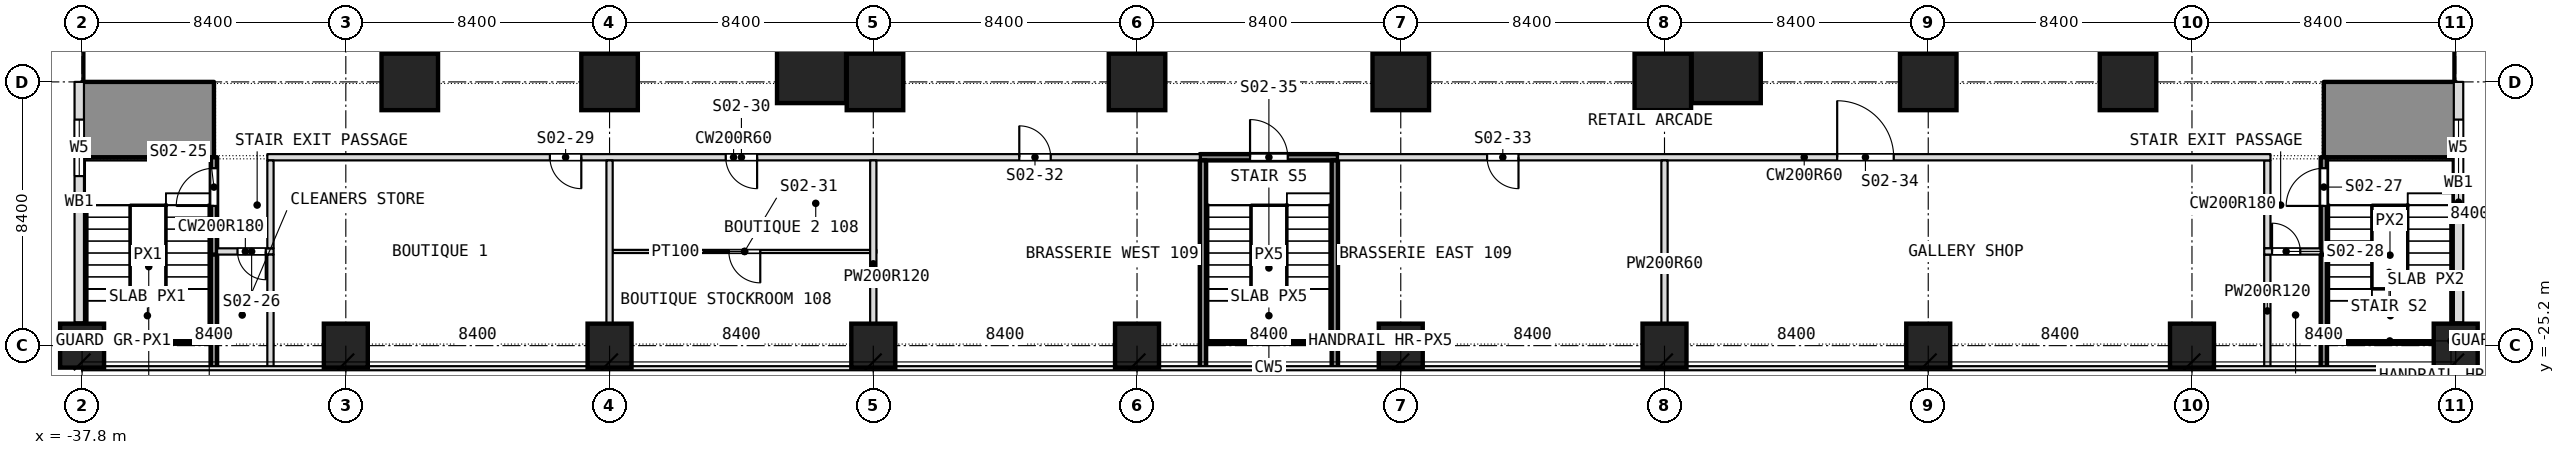
"""IFC4 building model, lengths in metres.
Left out: names, types, materials, properties, quantities, classifications, styles, units other than length and angle.
Written with IfcOpenShell. Run it as: python <this file> out.ifc"""

import sys

from ifc_helpers import new_model, si_unit, direction, frame, frame_2d, origin, origin_2d, place, context, subcontext, project, spatial, rectangle, extrude, element, fill, save


model = new_model("IFC4")
c1 = context("Model", 3, precision=1e-05, world=origin(), true_north=direction((0.0, 1.0)))
c2 = subcontext(c1, "Body", "Model", "MODEL_VIEW")
j1 = project(units=[si_unit("LENGTHUNIT", "METRE"), si_unit("PLANEANGLEUNIT", "RADIAN")], contexts=[c1])
p1 = place(None, origin())
s1 = spatial("IfcSite", under=j1, at=p1, CompositionType="ELEMENT")
p2 = place(p1, origin())
s2 = spatial("IfcBuilding", under=s1, at=p2, CompositionType="ELEMENT")
p3 = place(p2, frame((0.0, 0.0, 8.0)))
s3 = spatial("IfcBuildingStorey", under=s2, at=p3, CompositionType="ELEMENT", Elevation=8.0)
for number, where, z_axis, x_axis in (
    (1, (-37.8, -25.2, 0.0), (0.0, 0.0, 1.0), (1.0, 0.0, 0.0)),
    (2, (-29.4, -25.2, 0.0), (0.0, 0.0, 1.0), (1.0, 0.0, 0.0)),
    (3, (-21.0, -25.2, 0.0), (0.0, 0.0, 1.0), (1.0, 0.0, 0.0)),
    (4, (-12.6, -25.2, 0.0), (0.0, 0.0, 1.0), (1.0, 0.0, 0.0)),
    (5, (-4.2, -25.2, 0.0), (0.0, 0.0, 1.0), (1.0, 0.0, 0.0)),
    (6, (4.2, -25.2, 0.0), (0.0, 0.0, 1.0), (1.0, 0.0, 0.0)),
    (7, (12.6, -25.2, 0.0), (0.0, 0.0, 1.0), (1.0, 0.0, 0.0)),
    (8, (21.0, -25.2, 0.0), (0.0, 0.0, 1.0), (1.0, 0.0, 0.0)),
    (9, (29.4, -25.2, 0.0), (0.0, 0.0, 1.0), (1.0, 0.0, 0.0)),
    (10, (37.8, -25.2, 0.0), (0.0, 0.0, 1.0), (1.0, 0.0, 0.0)),
):
    element("IfcColumn", number, at=place(p3, frame(where, z_axis=z_axis, x_axis=x_axis)), inside=s3, PredefinedType="COLUMN", context=c2, shape_type="SweptSolid", body=[
        extrude(rectangle(XDim=1.4, YDim=1.4, at=origin_2d()), origin(), (0.0, 0.0, 1.0), 5.0),
    ])
for number, where, z_axis, x_axis in (
    (11, (-21.0, -16.8, 0.0), (0.0, 0.0, 1.0), (1.0, 0.0, 0.0)),
    (12, (-12.546, -16.8, 0.0), (0.0, 0.0, 1.0), (1.0, 0.0, 0.0)),
    (13, (-4.2, -16.8, 0.0), (0.0, 0.0, 1.0), (1.0, 0.0, 0.0)),
    (14, (4.2, -16.8, 0.0), (0.0, 0.0, 1.0), (1.0, 0.0, 0.0)),
    (15, (12.546, -16.8, 0.0), (0.0, 0.0, 1.0), (1.0, 0.0, 0.0)),
    (16, (21.0, -16.8, 0.0), (0.0, 0.0, 1.0), (1.0, 0.0, 0.0)),
    (17, (-27.363, -16.8, 0.0), (0.0, 0.0, 1.0), (1.0, 0.0, 0.0)),
    (18, (27.363, -16.8, 0.0), (0.0, 0.0, 1.0), (1.0, 0.0, 0.0)),
):
    element("IfcColumn", number, at=place(p3, frame(where, z_axis=z_axis, x_axis=x_axis)), inside=s3, PredefinedType="COLUMN", context=c2, shape_type="SweptSolid", body=[
        extrude(rectangle(XDim=1.8, YDim=1.8, at=origin_2d()), origin(), (0.0, 0.0, 1.0), 5.0),
    ])
for number, where, z_axis, x_axis in (
    (19, (-14.566, -16.375, 0.0), (0.0, 0.0, 1.0), (1.0, 0.0, 0.0)),
    (20, (14.566, -16.375, 0.0), (0.0, 0.0, 1.0), (1.0, 0.0, 0.0)),
):
    element("IfcColumn", number, at=place(p3, frame(where, z_axis=z_axis, x_axis=x_axis)), inside=s3, PredefinedType="COLUMN", context=c2, shape_type="SweptSolid", body=[
        extrude(rectangle(XDim=2.2, YDim=2.2, at=origin_2d()), origin(), (0.0, 0.0, 1.0), 5.0),
    ])
for number, where, z_axis, x_axis in (
    (21, (-37.8, -18.0, 0.0), (0.0, 0.0, 1.0), (1.0, 0.0, 0.0)),
    (22, (33.6, -18.0, 0.0), (0.0, 0.0, 1.0), (1.0, 0.0, 0.0)),
):
    element("IfcWall", number, at=place(p3, frame(where, z_axis=z_axis, x_axis=x_axis)), inside=s3, PredefinedType="SOLIDWALL", context=c2, shape_type="SweptSolid", body=[
        extrude(rectangle(XDim=4.2, YDim=2.4, at=frame_2d((2.1, 0.0))), origin(), (0.0, 0.0, 1.0), 5.0),
    ])
p4 = place(p3, frame((33.6, -25.889, 0.0), z_axis=(0.0, 0.0, 1.0), x_axis=(0.0, 1.0, 0.0)))
e23 = element("IfcWall", 23, at=p4, inside=s3, PredefinedType="PARTITIONING", context=c2, shape_type="SweptSolid", body=[
    extrude(rectangle(XDim=3.789, YDim=0.2, at=frame_2d((1.895, 0.0))), origin(), (0.0, 0.0, 1.0), 4.68),
])
p5 = place(p3, frame((33.6, -22.3, 0.0), z_axis=(0.0, 0.0, 1.0), x_axis=(0.0, 1.0, 0.0)))
e24 = element("IfcWall", 24, at=p5, inside=s3, PredefinedType="PARTITIONING", context=c2, shape_type="SweptSolid", body=[
    extrude(rectangle(XDim=3.1, YDim=0.2, at=frame_2d((1.55, 0.0))), origin(), (0.0, 0.0, 1.0), 4.68),
])
p6 = place(p5, frame((1.55, 0.0, 0.0)))
e25 = element("IfcOpeningElement", 25, at=p6, cuts=e24, PredefinedType="OPENING", context=c2, shape_type="SweptSolid", body=[
    extrude(rectangle(XDim=1.2, YDim=2.1, at=frame_2d((0.6, 1.05))), frame((0.0, 0.1, 0.0), z_axis=(0.0, -1.0, 0.0), x_axis=(1.0, 0.0, 0.0)), (0.0, 0.0, 1.0), 0.2),
])
p7 = place(p3, frame((31.8, -25.889, 0.0), z_axis=(0.0, 0.0, 1.0), x_axis=(0.0, 1.0, 0.0)))
e26 = element("IfcWall", 26, at=p7, inside=s3, PredefinedType="PARTITIONING", context=c2, shape_type="SweptSolid", body=[
    extrude(rectangle(XDim=3.589, YDim=0.2, at=frame_2d((1.794, 0.0))), origin(), (0.0, 0.0, 1.0), 4.68),
])
p8 = place(p3, frame((31.8, -22.1, 0.0), z_axis=(0.0, 0.0, 1.0), x_axis=(0.0, 1.0, 0.0)))
e27 = element("IfcWall", 27, at=p8, inside=s3, PredefinedType="PARTITIONING", context=c2, shape_type="SweptSolid", body=[
    extrude(rectangle(XDim=2.8, YDim=0.2, at=frame_2d((1.4, 0.0))), origin(), (0.0, 0.0, 1.0), 4.68),
])
p9 = place(p3, frame((-33.5, -22.2, 0.0), z_axis=(0.0, 0.0, 1.0), x_axis=(1.0, 0.0, 0.0)))
e28 = element("IfcWall", 28, at=p9, inside=s3, PredefinedType="PARTITIONING", context=c2, shape_type="SweptSolid", body=[
    extrude(rectangle(XDim=1.8, YDim=0.2, at=frame_2d((0.9, 0.0))), origin(), (0.0, 0.0, 1.0), 4.68),
])
p10 = place(p9, frame((0.65, 0.0, 0.0)))
e29 = element("IfcOpeningElement", 29, at=p10, cuts=e28, PredefinedType="OPENING", context=c2, shape_type="SweptSolid", body=[
    extrude(rectangle(XDim=0.9, YDim=2.1, at=frame_2d((0.45, 1.05))), frame((0.0, 0.1, 0.0), z_axis=(0.0, -1.0, 0.0), x_axis=(1.0, 0.0, 0.0)), (0.0, 0.0, 1.0), 0.2),
])
p11 = place(p3, frame((31.7, -22.2, 0.0), z_axis=(0.0, 0.0, 1.0), x_axis=(1.0, 0.0, 0.0)))
e30 = element("IfcWall", 30, at=p11, inside=s3, PredefinedType="PARTITIONING", context=c2, shape_type="SweptSolid", body=[
    extrude(rectangle(XDim=1.8, YDim=0.2, at=frame_2d((0.9, 0.0))), origin(), (0.0, 0.0, 1.0), 4.68),
])
p12 = place(p11, frame((0.25, 0.0, 0.0)))
e31 = element("IfcOpeningElement", 31, at=p12, cuts=e30, PredefinedType="OPENING", context=c2, shape_type="SweptSolid", body=[
    extrude(rectangle(XDim=0.9, YDim=2.1, at=frame_2d((0.45, 1.05))), frame((0.0, 0.1, 0.0), z_axis=(0.0, -1.0, 0.0), x_axis=(1.0, 0.0, 0.0)), (0.0, 0.0, 1.0), 0.2),
])
p13 = place(p3, frame((-20.9, -22.2, 0.0), z_axis=(0.0, 0.0, 1.0), x_axis=(1.0, 0.0, 0.0)))
e32 = element("IfcWall", 32, at=p13, inside=s3, PredefinedType="PARTITIONING", context=c2, shape_type="SweptSolid", body=[
    extrude(rectangle(XDim=8.4, YDim=0.1, at=frame_2d((4.2, 0.0))), origin(), (0.0, 0.0, 1.0), 4.68),
])
p14 = place(p13, frame((3.7, 0.0, 0.0)))
e33 = element("IfcOpeningElement", 33, at=p14, cuts=e32, PredefinedType="OPENING", context=c2, shape_type="SweptSolid", body=[
    extrude(rectangle(XDim=1.0, YDim=2.1, at=frame_2d((0.5, 1.05))), frame((0.0, 0.05, 0.0), z_axis=(0.0, -1.0, 0.0), x_axis=(1.0, 0.0, 0.0)), (0.0, 0.0, 1.0), 0.1),
])
p15 = place(p3, frame((-31.9, -19.2, 0.0), z_axis=(0.0, 0.0, 1.0), x_axis=(1.0, 0.0, 0.0)))
e34 = element("IfcWall", 34, at=p15, inside=s3, PredefinedType="PARTITIONING", context=c2, shape_type="SweptSolid", body=[
    extrude(rectangle(XDim=29.7, YDim=0.2, at=frame_2d((14.85, 0.0))), origin(), (0.0, 0.0, 1.0), 4.68),
])
p16 = place(p15, frame((9.0, 0.0, 0.0)))
e35 = element("IfcOpeningElement", 35, at=p16, cuts=e34, PredefinedType="OPENING", context=c2, shape_type="SweptSolid", body=[
    extrude(rectangle(XDim=1.0, YDim=2.1, at=frame_2d((0.5, 1.05))), frame((0.0, 0.1, 0.0), z_axis=(0.0, -1.0, 0.0), x_axis=(1.0, 0.0, 0.0)), (0.0, 0.0, 1.0), 0.2),
])
p17 = place(p15, frame((14.6, 0.0, 0.0)))
e36 = element("IfcOpeningElement", 36, at=p17, cuts=e34, PredefinedType="OPENING", context=c2, shape_type="SweptSolid", body=[
    extrude(rectangle(XDim=1.0, YDim=2.1, at=frame_2d((0.5, 1.05))), frame((0.0, 0.1, 0.0), z_axis=(0.0, -1.0, 0.0), x_axis=(1.0, 0.0, 0.0)), (0.0, 0.0, 1.0), 0.2),
])
p18 = place(p15, frame((23.95, 0.0, 0.0)))
e37 = element("IfcOpeningElement", 37, at=p18, cuts=e34, PredefinedType="OPENING", context=c2, shape_type="SweptSolid", body=[
    extrude(rectangle(XDim=1.0, YDim=2.1, at=frame_2d((0.5, 1.05))), frame((0.0, 0.1, 0.0), z_axis=(0.0, -1.0, 0.0), x_axis=(1.0, 0.0, 0.0)), (0.0, 0.0, 1.0), 0.2),
])
p19 = place(p3, frame((2.2, -19.2, 0.0), z_axis=(0.0, 0.0, 1.0), x_axis=(1.0, 0.0, 0.0)))
e38 = element("IfcWall", 38, at=p19, inside=s3, PredefinedType="PARTITIONING", context=c2, shape_type="SweptSolid", body=[
    extrude(rectangle(XDim=29.7, YDim=0.2, at=frame_2d((14.85, 0.0))), origin(), (0.0, 0.0, 1.0), 4.68),
])
p20 = place(p19, frame((4.75, 0.0, 0.0)))
e39 = element("IfcOpeningElement", 39, at=p20, cuts=e38, PredefinedType="OPENING", context=c2, shape_type="SweptSolid", body=[
    extrude(rectangle(XDim=1.0, YDim=2.1, at=frame_2d((0.5, 1.05))), frame((0.0, 0.1, 0.0), z_axis=(0.0, -1.0, 0.0), x_axis=(1.0, 0.0, 0.0)), (0.0, 0.0, 1.0), 0.2),
])
p21 = place(p19, frame((15.9, 0.0, 0.0)))
e40 = element("IfcOpeningElement", 40, at=p21, cuts=e38, PredefinedType="OPENING", context=c2, shape_type="SweptSolid", body=[
    extrude(rectangle(XDim=1.8, YDim=2.1, at=frame_2d((0.9, 1.05))), frame((0.0, 0.1, 0.0), z_axis=(0.0, -1.0, 0.0), x_axis=(1.0, 0.0, 0.0)), (0.0, 0.0, 1.0), 0.2),
])
p22 = place(p3, frame((-2.2, -19.2, 0.0), z_axis=(0.0, 0.0, 1.0), x_axis=(1.0, 0.0, 0.0)))
e41 = element("IfcWall", 41, at=p22, inside=s3, PredefinedType="PARTITIONING", context=c2, shape_type="SweptSolid", body=[
    extrude(rectangle(XDim=4.4, YDim=0.2, at=frame_2d((2.2, 0.0))), origin(), (0.0, 0.0, 1.0), 4.68),
])
p23 = place(p22, frame((1.6, 0.0, 0.0)))
e42 = element("IfcOpeningElement", 42, at=p23, cuts=e41, PredefinedType="OPENING", context=c2, shape_type="SweptSolid", body=[
    extrude(rectangle(XDim=1.2, YDim=2.1, at=frame_2d((0.6, 1.05))), frame((0.0, 0.1, 0.0), z_axis=(0.0, -1.0, 0.0), x_axis=(1.0, 0.0, 0.0)), (0.0, 0.0, 1.0), 0.2),
])
for number, where, z_axis, x_axis in (
    (43, (12.6, -25.889, 0.0), (0.0, 0.0, 1.0), (0.0, 1.0, 0.0)),
    (44, (2.1, -25.889, 0.0), (0.0, 0.0, 1.0), (0.0, 1.0, 0.0)),
    (45, (-2.1, -25.889, 0.0), (0.0, 0.0, 1.0), (0.0, 1.0, 0.0)),
    (46, (-12.6, -25.889, 0.0), (0.0, 0.0, 1.0), (0.0, 1.0, 0.0)),
    (47, (-21.0, -25.889, 0.0), (0.0, 0.0, 1.0), (0.0, 1.0, 0.0)),
):
    element("IfcWall", number, at=place(p3, frame(where, z_axis=z_axis, x_axis=x_axis)), inside=s3, PredefinedType="PARTITIONING", context=c2, shape_type="SweptSolid", body=[
        extrude(rectangle(XDim=6.589, YDim=0.2, at=frame_2d((3.294, 0.0))), origin(), (0.0, 0.0, 1.0), 4.68),
    ])
p24 = place(p3, frame((-31.8, -25.889, 0.0), z_axis=(0.0, 0.0, 1.0), x_axis=(0.0, 1.0, 0.0)))
e48 = element("IfcWall", 48, at=p24, inside=s3, PredefinedType="PARTITIONING", context=c2, shape_type="SweptSolid", body=[
    extrude(rectangle(XDim=3.589, YDim=0.2, at=frame_2d((1.794, 0.0))), origin(), (0.0, 0.0, 1.0), 4.68),
])
p25 = place(p3, frame((-31.8, -22.1, 0.0), z_axis=(0.0, 0.0, 1.0), x_axis=(0.0, 1.0, 0.0)))
e49 = element("IfcWall", 49, at=p25, inside=s3, PredefinedType="PARTITIONING", context=c2, shape_type="SweptSolid", body=[
    extrude(rectangle(XDim=2.8, YDim=0.2, at=frame_2d((1.4, 0.0))), origin(), (0.0, 0.0, 1.0), 4.68),
])
p26 = place(p3, frame((-33.6, -25.889, 0.0), z_axis=(0.0, 0.0, 1.0), x_axis=(0.0, 1.0, 0.0)))
e50 = element("IfcWall", 50, at=p26, inside=s3, PredefinedType="PARTITIONING", context=c2, shape_type="SweptSolid", body=[
    extrude(rectangle(XDim=3.789, YDim=0.2, at=frame_2d((1.895, 0.0))), origin(), (0.0, 0.0, 1.0), 4.68),
])
p27 = place(p3, frame((-33.6, -22.3, 0.0), z_axis=(0.0, 0.0, 1.0), x_axis=(0.0, 1.0, 0.0)))
e51 = element("IfcWall", 51, at=p27, inside=s3, PredefinedType="PARTITIONING", context=c2, shape_type="SweptSolid", body=[
    extrude(rectangle(XDim=3.1, YDim=0.2, at=frame_2d((1.55, 0.0))), origin(), (0.0, 0.0, 1.0), 4.68),
])
p28 = place(p27, frame((1.55, 0.0, 0.0)))
e52 = element("IfcOpeningElement", 52, at=p28, cuts=e51, PredefinedType="OPENING", context=c2, shape_type="SweptSolid", body=[
    extrude(rectangle(XDim=1.2, YDim=2.1, at=frame_2d((0.6, 1.05))), frame((0.0, 0.1, 0.0), z_axis=(0.0, -1.0, 0.0), x_axis=(1.0, 0.0, 0.0)), (0.0, 0.0, 1.0), 0.2),
])
p29 = place(p3, frame((37.89, -24.46, 0.0), z_axis=(0.0, 0.0, 1.0), x_axis=(0.0, 1.0, 0.0)))
e53 = element("IfcWall", 53, at=p29, inside=s3, PredefinedType="NOTDEFINED", context=c2, shape_type="SweptSolid", body=[
    extrude(rectangle(XDim=7.66, YDim=0.3, at=frame_2d((3.83, 0.0))), origin(), (0.0, 0.0, 1.0), 3.78),
])
p30 = place(p29, frame((4.66, 0.0, 1.2)))
e54 = element("IfcOpeningElement", 54, at=p30, cuts=e53, PredefinedType="OPENING", context=c2, shape_type="SweptSolid", body=[
    extrude(rectangle(XDim=1.8, YDim=2.4, at=frame_2d((0.9, 1.2))), frame((0.0, 0.15, 0.0), z_axis=(0.0, -1.0, 0.0), x_axis=(1.0, 0.0, 0.0)), (0.0, 0.0, 1.0), 0.3),
])
p31 = place(p3, frame((-37.89, -16.8, 0.0), z_axis=(0.0, 0.0, 1.0), x_axis=(0.0, -1.0, 0.0)))
e55 = element("IfcWall", 55, at=p31, inside=s3, PredefinedType="NOTDEFINED", context=c2, shape_type="SweptSolid", body=[
    extrude(rectangle(XDim=7.66, YDim=0.3, at=frame_2d((3.83, 0.0))), origin(), (0.0, 0.0, 1.0), 3.78),
])
p32 = place(p31, frame((1.2, 0.0, 1.2)))
e56 = element("IfcOpeningElement", 56, at=p32, cuts=e55, PredefinedType="OPENING", context=c2, shape_type="SweptSolid", body=[
    extrude(rectangle(XDim=1.8, YDim=2.4, at=frame_2d((0.9, 1.2))), frame((0.0, 0.15, 0.0), z_axis=(0.0, -1.0, 0.0), x_axis=(1.0, 0.0, 0.0)), (0.0, 0.0, 1.0), 0.3),
])
p33 = place(p6, origin())
e57 = element("IfcDoor", 57, at=p33, inside=s3, OperationType="SINGLE_SWING_LEFT", PredefinedType="DOOR", context=c2, shape_type="SweptSolid", body=[
    extrude(rectangle(XDim=1.2, YDim=2.1, at=frame_2d((0.6, 1.05))), frame((0.0, 0.025, 0.0), z_axis=(0.0, -1.0, 0.0), x_axis=(1.0, 0.0, 0.0)), (0.0, 0.0, 1.0), 0.05),
])
fill(e25, e57)
p34 = place(p10, origin())
e58 = element("IfcDoor", 58, at=p34, inside=s3, OperationType="SINGLE_SWING_LEFT", PredefinedType="DOOR", context=c2, shape_type="SweptSolid", body=[
    extrude(rectangle(XDim=0.9, YDim=2.1, at=frame_2d((0.45, 1.05))), frame((0.0, 0.025, 0.0), z_axis=(0.0, -1.0, 0.0), x_axis=(1.0, 0.0, 0.0)), (0.0, 0.0, 1.0), 0.05),
])
fill(e29, e58)
p35 = place(p12, origin())
e59 = element("IfcDoor", 59, at=p35, inside=s3, OperationType="SINGLE_SWING_RIGHT", PredefinedType="DOOR", context=c2, shape_type="SweptSolid", body=[
    extrude(rectangle(XDim=0.9, YDim=2.1, at=frame_2d((0.45, 1.05))), frame((0.0, 0.025, 0.0), z_axis=(0.0, -1.0, 0.0), x_axis=(1.0, 0.0, 0.0)), (0.0, 0.0, 1.0), 0.05),
])
fill(e31, e59)
p36 = place(p14, origin())
e60 = element("IfcDoor", 60, at=p36, inside=s3, OperationType="SINGLE_SWING_LEFT", PredefinedType="DOOR", context=c2, shape_type="SweptSolid", body=[
    extrude(rectangle(XDim=1.0, YDim=2.1, at=frame_2d((0.5, 1.05))), frame((0.0, 0.025, 0.0), z_axis=(0.0, -1.0, 0.0), x_axis=(1.0, 0.0, 0.0)), (0.0, 0.0, 1.0), 0.05),
])
fill(e33, e60)
p37 = place(p16, origin())
e61 = element("IfcDoor", 61, at=p37, inside=s3, OperationType="SINGLE_SWING_RIGHT", PredefinedType="DOOR", context=c2, shape_type="SweptSolid", body=[
    extrude(rectangle(XDim=1.0, YDim=2.1, at=frame_2d((0.5, 1.05))), frame((0.0, 0.025, 0.0), z_axis=(0.0, -1.0, 0.0), x_axis=(1.0, 0.0, 0.0)), (0.0, 0.0, 1.0), 0.05),
])
fill(e35, e61)
p38 = place(p17, origin())
e62 = element("IfcDoor", 62, at=p38, inside=s3, OperationType="SINGLE_SWING_RIGHT", PredefinedType="DOOR", context=c2, shape_type="SweptSolid", body=[
    extrude(rectangle(XDim=1.0, YDim=2.1, at=frame_2d((0.5, 1.05))), frame((0.0, 0.025, 0.0), z_axis=(0.0, -1.0, 0.0), x_axis=(1.0, 0.0, 0.0)), (0.0, 0.0, 1.0), 0.05),
])
fill(e36, e62)
p39 = place(p18, origin())
e63 = element("IfcDoor", 63, at=p39, inside=s3, OperationType="SINGLE_SWING_RIGHT", PredefinedType="DOOR", context=c2, shape_type="SweptSolid", body=[
    extrude(rectangle(XDim=1.0, YDim=2.1, at=frame_2d((0.5, 1.05))), frame((0.0, 0.025, 0.0), z_axis=(0.0, -1.0, 0.0), x_axis=(1.0, 0.0, 0.0)), (0.0, 0.0, 1.0), 0.05),
])
fill(e37, e63)
p40 = place(p20, origin())
e64 = element("IfcDoor", 64, at=p40, inside=s3, OperationType="SINGLE_SWING_LEFT", PredefinedType="DOOR", context=c2, shape_type="SweptSolid", body=[
    extrude(rectangle(XDim=1.0, YDim=2.1, at=frame_2d((0.5, 1.05))), frame((0.0, 0.025, 0.0), z_axis=(0.0, -1.0, 0.0), x_axis=(1.0, 0.0, 0.0)), (0.0, 0.0, 1.0), 0.05),
])
fill(e39, e64)
p41 = place(p21, origin())
e65 = element("IfcDoor", 65, at=p41, inside=s3, OperationType="DOUBLE_DOOR_SINGLE_SWING", PredefinedType="DOOR", context=c2, shape_type="SweptSolid", body=[
    extrude(rectangle(XDim=1.8, YDim=2.1, at=frame_2d((0.9, 1.05))), frame((0.0, 0.025, 0.0), z_axis=(0.0, -1.0, 0.0), x_axis=(1.0, 0.0, 0.0)), (0.0, 0.0, 1.0), 0.05),
])
fill(e40, e65)
p42 = place(p23, origin())
e66 = element("IfcDoor", 66, at=p42, inside=s3, OperationType="SINGLE_SWING_LEFT", PredefinedType="DOOR", context=c2, shape_type="SweptSolid", body=[
    extrude(rectangle(XDim=1.2, YDim=2.1, at=frame_2d((0.6, 1.05))), frame((0.0, 0.025, 0.0), z_axis=(0.0, -1.0, 0.0), x_axis=(1.0, 0.0, 0.0)), (0.0, 0.0, 1.0), 0.05),
])
fill(e42, e66)
p43 = place(p28, origin())
e67 = element("IfcDoor", 67, at=p43, inside=s3, OperationType="SINGLE_SWING_RIGHT", PredefinedType="DOOR", context=c2, shape_type="SweptSolid", body=[
    extrude(rectangle(XDim=1.2, YDim=2.1, at=frame_2d((0.6, 1.05))), frame((0.0, 0.025, 0.0), z_axis=(0.0, -1.0, 0.0), x_axis=(1.0, 0.0, 0.0)), (0.0, 0.0, 1.0), 0.05),
])
fill(e52, e67)
p44 = place(p30, origin())
e68 = element("IfcWindow", 68, at=p44, inside=s3, PartitioningType="SINGLE_PANEL", PredefinedType="WINDOW", context=c2, shape_type="SweptSolid", body=[
    extrude(rectangle(XDim=1.8, YDim=2.4, at=frame_2d((0.9, 1.2))), frame((0.0, 0.03, 0.0), z_axis=(0.0, -1.0, 0.0), x_axis=(1.0, 0.0, 0.0)), (0.0, 0.0, 1.0), 0.06),
])
fill(e54, e68)
p45 = place(p32, origin())
e69 = element("IfcWindow", 69, at=p45, inside=s3, PartitioningType="SINGLE_PANEL", PredefinedType="WINDOW", context=c2, shape_type="SweptSolid", body=[
    extrude(rectangle(XDim=1.8, YDim=2.4, at=frame_2d((0.9, 1.2))), frame((0.0, 0.03, 0.0), z_axis=(0.0, -1.0, 0.0), x_axis=(1.0, 0.0, 0.0)), (0.0, 0.0, 1.0), 0.06),
])
fill(e56, e69)
save(model, sys.argv[1])
